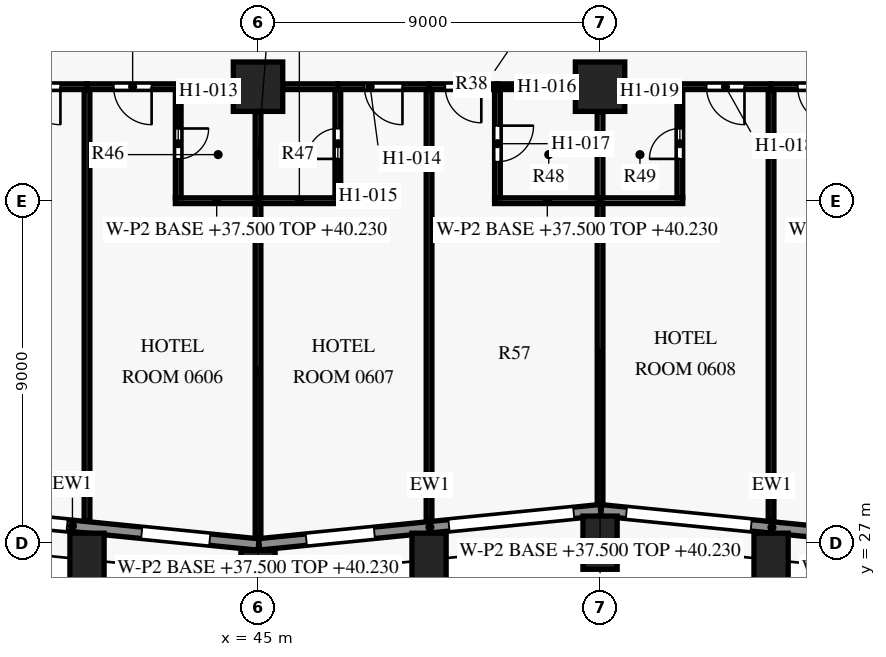
"""IFC4 building model, lengths in metres.
Left out: names, types, materials, properties, quantities, classifications, styles, units other than length and angle.
Written with IfcOpenShell. Run it as: python <this file> out.ifc"""

import sys

from ifc_helpers import new_model, si_unit, direction, frame, frame_2d, origin, origin_2d, place, context, subcontext, project, spatial, rectangle, extrude, element, fill, save


model = new_model("IFC4")
c1 = context("Model", 3, precision=1e-05, world=origin(), true_north=direction((0.0, 1.0)))
c2 = subcontext(c1, "Body", "Model", "MODEL_VIEW")
j1 = project(units=[si_unit("LENGTHUNIT", "METRE"), si_unit("PLANEANGLEUNIT", "RADIAN")], contexts=[c1])
p1 = place(None, origin())
s1 = spatial("IfcSite", under=j1, at=p1, CompositionType="ELEMENT")
p2 = place(p1, origin())
s2 = spatial("IfcBuilding", under=s1, at=p2, CompositionType="ELEMENT")
p3 = place(p2, frame((0.0, 0.0, 37.5)))
s3 = spatial("IfcBuildingStorey", under=s2, at=p3, CompositionType="ELEMENT", Elevation=37.5)
for number, where, z_axis, x_axis in (
    (1, (40.5, 26.55, 0.0), (0.0, 0.0, 1.0), (0.995, -0.1, 0.0)),
    (2, (45.0, 26.1, 0.0), (0.0, 0.0, 1.0), (1.0, 0.0, 0.0)),
    (3, (49.5, 26.55, 0.0), (0.0, 0.0, 1.0), (0.995, 0.1, 0.0)),
    (4, (54.0, 27.0, 0.0), (0.0, 0.0, 1.0), (1.0, 0.0, 0.0)),
    (5, (58.5, 26.55, 0.0), (0.0, 0.0, 1.0), (0.995, -0.1, 0.0)),
):
    element("IfcColumn", number, at=place(p3, frame(where, z_axis=z_axis, x_axis=x_axis)), inside=s3, PredefinedType="COLUMN", context=c2, shape_type="SweptSolid", body=[
        extrude(rectangle(XDim=0.9, YDim=1.4, at=origin_2d()), origin(), (0.0, 0.0, 1.0), 3.6),
    ])
for number, where, z_axis, x_axis in (
    (6, (45.0, 39.0, 0.0), (0.0, 0.0, 1.0), (1.0, 0.0, 0.0)),
    (7, (54.0, 39.0, 0.0), (0.0, 0.0, 1.0), (1.0, 0.0, 0.0)),
):
    element("IfcColumn", number, at=place(p3, frame(where, z_axis=z_axis, x_axis=x_axis)), inside=s3, PredefinedType="COLUMN", context=c2, shape_type="SweptSolid", body=[
        extrude(rectangle(XDim=1.3, YDim=1.3, at=origin_2d()), origin(), (0.0, 0.0, 1.0), 3.6),
    ])
p4 = place(p3, frame((45.015, 26.953, 0.0), z_axis=(0.0, 0.0, 1.0), x_axis=(-0.995036699177, 0.099508629231, 0.0)))
e8 = element("IfcWall", 8, at=p4, inside=s3, PredefinedType="SOLIDWALL", context=c2, shape_type="SweptSolid", body=[
    extrude(rectangle(XDim=9.846, YDim=0.3, at=frame_2d((4.923, 0.0))), origin(), (0.0, 0.0, 1.0), 2.95),
])
p5 = place(p4, frame((1.291, 0.0, 0.75)))
e9 = element("IfcOpeningElement", 9, at=p5, cuts=e8, PredefinedType="OPENING", context=c2, shape_type="SweptSolid", body=[
    extrude(rectangle(XDim=1.8, YDim=1.8, at=frame_2d((0.9, 0.9))), frame((0.0, 0.16, 0.0), z_axis=(0.0, -1.0, 0.0), x_axis=(1.0, 0.0, 0.0)), (0.0, 0.0, 1.0), 0.32),
])
p6 = place(p4, frame((5.064, 0.0, 0.15)))
e10 = element("IfcOpeningElement", 10, at=p6, cuts=e8, PredefinedType="OPENING", context=c2, shape_type="SweptSolid", body=[
    extrude(rectangle(XDim=3.3, YDim=2.4, at=frame_2d((1.65, 1.2))), frame((0.0, 0.16, 0.0), z_axis=(0.0, -1.0, 0.0), x_axis=(1.0, 0.0, 0.0)), (0.0, 0.0, 1.0), 0.32),
])
p7 = place(p3, frame((54.015, 27.856, 0.0), z_axis=(0.0, 0.0, 1.0), x_axis=(-0.995037993253, -0.099495688264, 0.0)))
e11 = element("IfcWall", 11, at=p7, inside=s3, PredefinedType="SOLIDWALL", context=c2, shape_type="SweptSolid", body=[
    extrude(rectangle(XDim=9.03, YDim=0.3, at=frame_2d((4.515, 0.0))), origin(), (0.0, 0.0, 1.0), 2.95),
])
p8 = place(p7, frame((0.711, 0.0, 0.15)))
e12 = element("IfcOpeningElement", 12, at=p8, cuts=e11, PredefinedType="OPENING", context=c2, shape_type="SweptSolid", body=[
    extrude(rectangle(XDim=3.3, YDim=2.4, at=frame_2d((1.65, 1.2))), frame((0.0, 0.16, 0.0), z_axis=(0.0, -1.0, 0.0), x_axis=(1.0, 0.0, 0.0)), (0.0, 0.0, 1.0), 0.32),
])
p9 = place(p7, frame((5.984, 0.0, 0.75)))
e13 = element("IfcOpeningElement", 13, at=p9, cuts=e11, PredefinedType="OPENING", context=c2, shape_type="SweptSolid", body=[
    extrude(rectangle(XDim=1.8, YDim=1.8, at=frame_2d((0.9, 0.9))), frame((0.0, 0.16, 0.0), z_axis=(0.0, -1.0, 0.0), x_axis=(1.0, 0.0, 0.0)), (0.0, 0.0, 1.0), 0.32),
])
p10 = place(p3, frame((63.015, 26.953, 0.0), z_axis=(0.0, 0.0, 1.0), x_axis=(-0.995035316196, 0.099522457379, 0.0)))
e14 = element("IfcWall", 14, at=p10, inside=s3, PredefinedType="SOLIDWALL", context=c2, shape_type="SweptSolid", body=[
    extrude(rectangle(XDim=9.03, YDim=0.3, at=frame_2d((4.515, 0.0))), origin(), (0.0, 0.0, 1.0), 2.95),
])
p11 = place(p10, frame((1.291, 0.0, 0.75)))
e15 = element("IfcOpeningElement", 15, at=p11, cuts=e14, PredefinedType="OPENING", context=c2, shape_type="SweptSolid", body=[
    extrude(rectangle(XDim=1.8, YDim=1.8, at=frame_2d((0.9, 0.9))), frame((0.0, 0.16, 0.0), z_axis=(0.0, -1.0, 0.0), x_axis=(1.0, 0.0, 0.0)), (0.0, 0.0, 1.0), 0.32),
])
p12 = place(p10, frame((5.064, 0.0, 0.15)))
e16 = element("IfcOpeningElement", 16, at=p12, cuts=e14, PredefinedType="OPENING", context=c2, shape_type="SweptSolid", body=[
    extrude(rectangle(XDim=3.3, YDim=2.4, at=frame_2d((1.65, 1.2))), frame((0.0, 0.16, 0.0), z_axis=(0.0, -1.0, 0.0), x_axis=(1.0, 0.0, 0.0)), (0.0, 0.0, 1.0), 0.32),
])
p13 = place(p3, frame((45.0, 35.925, 0.0), z_axis=(0.0, 0.0, 1.0), x_axis=(0.0, -1.0, 0.0)))
e17 = element("IfcWall", 17, at=p13, inside=s3, PredefinedType="PARTITIONING", context=c2, shape_type="SweptSolid", body=[
    extrude(rectangle(XDim=8.8, YDim=0.15, at=frame_2d((4.4, 0.0))), origin(), (0.0, 0.0, 1.0), 2.73),
])
p14 = place(p3, frame((54.0, 35.925, 0.0), z_axis=(0.0, 0.0, 1.0), x_axis=(0.0, -1.0, 0.0)))
e18 = element("IfcWall", 18, at=p14, inside=s3, PredefinedType="PARTITIONING", context=c2, shape_type="SweptSolid", body=[
    extrude(rectangle(XDim=7.9, YDim=0.15, at=frame_2d((3.95, 0.0))), origin(), (0.0, 0.0, 1.0), 2.73),
])
for number, where, z_axis, x_axis in (
    (19, (42.825, 36.0, 0.0), (0.0, 0.0, 1.0), (1.0, 0.0, 0.0)),
    (20, (45.0, 36.0, 0.0), (0.0, 0.0, 1.0), (1.0, 0.0, 0.0)),
):
    element("IfcWall", number, at=place(p3, frame(where, z_axis=z_axis, x_axis=x_axis)), inside=s3, PredefinedType="PARTITIONING", context=c2, shape_type="SweptSolid", body=[
        extrude(rectangle(XDim=2.175, YDim=0.15, at=frame_2d((1.087, 0.0))), origin(), (0.0, 0.0, 1.0), 2.73),
    ])
p15 = place(p3, frame((51.225, 36.0, 0.0), z_axis=(0.0, 0.0, 1.0), x_axis=(1.0, 0.0, 0.0)))
e21 = element("IfcWall", 21, at=p15, inside=s3, PredefinedType="PARTITIONING", context=c2, shape_type="SweptSolid", body=[
    extrude(rectangle(XDim=2.775, YDim=0.15, at=frame_2d((1.387, 0.0))), origin(), (0.0, 0.0, 1.0), 2.73),
])
p16 = place(p3, frame((54.0, 36.0, 0.0), z_axis=(0.0, 0.0, 1.0), x_axis=(1.0, 0.0, 0.0)))
e22 = element("IfcWall", 22, at=p16, inside=s3, PredefinedType="PARTITIONING", context=c2, shape_type="SweptSolid", body=[
    extrude(rectangle(XDim=2.175, YDim=0.15, at=frame_2d((1.087, 0.0))), origin(), (0.0, 0.0, 1.0), 2.73),
])
p17 = place(p3, frame((47.1, 36.075, 0.0), z_axis=(0.0, 0.0, 1.0), x_axis=(0.0, 1.0, 0.0)))
e23 = element("IfcWall", 23, at=p17, inside=s3, PredefinedType="PARTITIONING", context=c2, shape_type="SweptSolid", body=[
    extrude(rectangle(XDim=2.85, YDim=0.15, at=frame_2d((1.425, 0.0))), origin(), (0.0, 0.0, 1.0), 2.58),
])
p18 = place(p17, frame((1.025, 0.0, 0.0)))
e24 = element("IfcOpeningElement", 24, at=p18, cuts=e23, PredefinedType="OPENING", context=c2, shape_type="SweptSolid", body=[
    extrude(rectangle(XDim=0.8, YDim=2.1, at=frame_2d((0.4, 1.05))), frame((0.0, 0.085, 0.0), z_axis=(0.0, -1.0, 0.0), x_axis=(1.0, 0.0, 0.0)), (0.0, 0.0, 1.0), 0.17),
])
p19 = place(p3, frame((56.1, 36.075, 0.0), z_axis=(0.0, 0.0, 1.0), x_axis=(0.0, 1.0, 0.0)))
e25 = element("IfcWall", 25, at=p19, inside=s3, PredefinedType="PARTITIONING", context=c2, shape_type="SweptSolid", body=[
    extrude(rectangle(XDim=2.85, YDim=0.15, at=frame_2d((1.425, 0.0))), origin(), (0.0, 0.0, 1.0), 2.58),
])
p20 = place(p19, frame((1.025, 0.0, 0.0)))
e26 = element("IfcOpeningElement", 26, at=p20, cuts=e25, PredefinedType="OPENING", context=c2, shape_type="SweptSolid", body=[
    extrude(rectangle(XDim=0.8, YDim=2.1, at=frame_2d((0.4, 1.05))), frame((0.0, 0.085, 0.0), z_axis=(0.0, -1.0, 0.0), x_axis=(1.0, 0.0, 0.0)), (0.0, 0.0, 1.0), 0.17),
])
for number, where, z_axis, x_axis in (
    (27, (45.0, 38.345, 0.0), (0.0, 0.0, 1.0), (0.0, -1.0, 0.0)),
    (28, (54.0, 38.345, 0.0), (0.0, 0.0, 1.0), (0.0, -1.0, 0.0)),
):
    element("IfcWall", number, at=place(p3, frame(where, z_axis=z_axis, x_axis=x_axis)), inside=s3, PredefinedType="PARTITIONING", context=c2, shape_type="SweptSolid", body=[
        extrude(rectangle(XDim=2.27, YDim=0.15, at=frame_2d((1.135, 0.0))), origin(), (0.0, 0.0, 1.0), 2.73),
    ])
p21 = place(p3, frame((40.5, 38.925, 0.0), z_axis=(0.0, 0.0, 1.0), x_axis=(0.0, -1.0, 0.0)))
e29 = element("IfcWall", 29, at=p21, inside=s3, PredefinedType="PARTITIONING", context=c2, shape_type="SweptSolid", body=[
    extrude(rectangle(XDim=11.35, YDim=0.15, at=frame_2d((5.675, 0.0))), origin(), (0.0, 0.0, 1.0), 2.58),
])
p22 = place(p3, frame((42.9, 38.925, 0.0), z_axis=(0.0, 0.0, 1.0), x_axis=(0.0, -1.0, 0.0)))
e30 = element("IfcWall", 30, at=p22, inside=s3, PredefinedType="PARTITIONING", context=c2, shape_type="SweptSolid", body=[
    extrude(rectangle(XDim=2.85, YDim=0.15, at=frame_2d((1.425, 0.0))), origin(), (0.0, 0.0, 1.0), 2.58),
])
p23 = place(p22, frame((1.025, 0.0, 0.0)))
e31 = element("IfcOpeningElement", 31, at=p23, cuts=e30, PredefinedType="OPENING", context=c2, shape_type="SweptSolid", body=[
    extrude(rectangle(XDim=0.8, YDim=2.1, at=frame_2d((0.4, 1.05))), frame((0.0, 0.085, 0.0), z_axis=(0.0, -1.0, 0.0), x_axis=(1.0, 0.0, 0.0)), (0.0, 0.0, 1.0), 0.17),
])
p24 = place(p3, frame((49.5, 38.925, 0.0), z_axis=(0.0, 0.0, 1.0), x_axis=(0.0, -1.0, 0.0)))
e32 = element("IfcWall", 32, at=p24, inside=s3, PredefinedType="PARTITIONING", context=c2, shape_type="SweptSolid", body=[
    extrude(rectangle(XDim=11.35, YDim=0.15, at=frame_2d((5.675, 0.0))), origin(), (0.0, 0.0, 1.0), 2.58),
])
p25 = place(p3, frame((51.3, 38.925, 0.0), z_axis=(0.0, 0.0, 1.0), x_axis=(0.0, -1.0, 0.0)))
e33 = element("IfcWall", 33, at=p25, inside=s3, PredefinedType="PARTITIONING", context=c2, shape_type="SweptSolid", body=[
    extrude(rectangle(XDim=2.85, YDim=0.15, at=frame_2d((1.425, 0.0))), origin(), (0.0, 0.0, 1.0), 2.58),
])
p26 = place(p25, frame((0.95, 0.0, 0.0)))
e34 = element("IfcOpeningElement", 34, at=p26, cuts=e33, PredefinedType="OPENING", context=c2, shape_type="SweptSolid", body=[
    extrude(rectangle(XDim=0.95, YDim=2.1, at=frame_2d((0.475, 1.05))), frame((0.0, 0.085, 0.0), z_axis=(0.0, -1.0, 0.0), x_axis=(1.0, 0.0, 0.0)), (0.0, 0.0, 1.0), 0.17),
])
p27 = place(p3, frame((58.5, 38.925, 0.0), z_axis=(0.0, 0.0, 1.0), x_axis=(0.0, -1.0, 0.0)))
e35 = element("IfcWall", 35, at=p27, inside=s3, PredefinedType="PARTITIONING", context=c2, shape_type="SweptSolid", body=[
    extrude(rectangle(XDim=11.35, YDim=0.15, at=frame_2d((5.675, 0.0))), origin(), (0.0, 0.0, 1.0), 2.58),
])
p28 = place(p3, frame((40.5, 39.0, 0.0), z_axis=(0.0, 0.0, 1.0), x_axis=(-1.0, 0.0, 0.0)))
e36 = element("IfcWall", 36, at=p28, inside=s3, PredefinedType="PARTITIONING", context=c2, shape_type="SweptSolid", body=[
    extrude(rectangle(XDim=2.4, YDim=0.15, at=frame_2d((1.2, 0.0))), origin(), (0.0, 0.0, 1.0), 2.58),
])
p29 = place(p28, frame((0.7, 0.0, 0.0)))
e37 = element("IfcOpeningElement", 37, at=p29, cuts=e36, PredefinedType="OPENING", context=c2, shape_type="SweptSolid", body=[
    extrude(rectangle(XDim=1.0, YDim=2.1, at=frame_2d((0.5, 1.05))), frame((0.0, 0.085, 0.0), z_axis=(0.0, -1.0, 0.0), x_axis=(1.0, 0.0, 0.0)), (0.0, 0.0, 1.0), 0.17),
])
p30 = place(p3, frame((42.9, 39.0, 0.0), z_axis=(0.0, 0.0, 1.0), x_axis=(-1.0, 0.0, 0.0)))
e38 = element("IfcWall", 38, at=p30, inside=s3, PredefinedType="PARTITIONING", context=c2, shape_type="SweptSolid", body=[
    extrude(rectangle(XDim=2.4, YDim=0.15, at=frame_2d((1.2, 0.0))), origin(), (0.0, 0.0, 1.0), 2.58),
])
p31 = place(p30, frame((0.7, 0.0, 0.0)))
e39 = element("IfcOpeningElement", 39, at=p31, cuts=e38, PredefinedType="OPENING", context=c2, shape_type="SweptSolid", body=[
    extrude(rectangle(XDim=1.0, YDim=2.1, at=frame_2d((0.5, 1.05))), frame((0.0, 0.085, 0.0), z_axis=(0.0, -1.0, 0.0), x_axis=(1.0, 0.0, 0.0)), (0.0, 0.0, 1.0), 0.17),
])
for number, where, z_axis, x_axis in (
    (40, (44.345, 39.0, 0.0), (0.0, 0.0, 1.0), (-1.0, 0.0, 0.0)),
    (41, (47.1, 39.0, 0.0), (0.0, 0.0, 1.0), (-1.0, 0.0, 0.0)),
):
    element("IfcWall", number, at=place(p3, frame(where, z_axis=z_axis, x_axis=x_axis)), inside=s3, PredefinedType="PARTITIONING", context=c2, shape_type="SweptSolid", body=[
        extrude(rectangle(XDim=1.445, YDim=0.15, at=frame_2d((0.723, 0.0))), origin(), (0.0, 0.0, 1.0), 2.58),
    ])
p32 = place(p3, frame((49.5, 39.0, 0.0), z_axis=(0.0, 0.0, 1.0), x_axis=(-1.0, 0.0, 0.0)))
e42 = element("IfcWall", 42, at=p32, inside=s3, PredefinedType="PARTITIONING", context=c2, shape_type="SweptSolid", body=[
    extrude(rectangle(XDim=2.4, YDim=0.15, at=frame_2d((1.2, 0.0))), origin(), (0.0, 0.0, 1.0), 2.58),
])
p33 = place(p32, frame((0.7, 0.0, 0.0)))
e43 = element("IfcOpeningElement", 43, at=p33, cuts=e42, PredefinedType="OPENING", context=c2, shape_type="SweptSolid", body=[
    extrude(rectangle(XDim=1.0, YDim=2.1, at=frame_2d((0.5, 1.05))), frame((0.0, 0.085, 0.0), z_axis=(0.0, -1.0, 0.0), x_axis=(1.0, 0.0, 0.0)), (0.0, 0.0, 1.0), 0.17),
])
p34 = place(p3, frame((51.3, 39.0, 0.0), z_axis=(0.0, 0.0, 1.0), x_axis=(-1.0, 0.0, 0.0)))
e44 = element("IfcWall", 44, at=p34, inside=s3, PredefinedType="PARTITIONING", context=c2, shape_type="SweptSolid", body=[
    extrude(rectangle(XDim=1.8, YDim=0.15, at=frame_2d((0.9, 0.0))), origin(), (0.0, 0.0, 1.0), 2.58),
])
p35 = place(p34, frame((0.425, 0.0, 0.0)))
e45 = element("IfcOpeningElement", 45, at=p35, cuts=e44, PredefinedType="OPENING", context=c2, shape_type="SweptSolid", body=[
    extrude(rectangle(XDim=0.95, YDim=2.1, at=frame_2d((0.475, 1.05))), frame((0.0, 0.085, 0.0), z_axis=(0.0, -1.0, 0.0), x_axis=(1.0, 0.0, 0.0)), (0.0, 0.0, 1.0), 0.17),
])
p36 = place(p3, frame((53.345, 39.0, 0.0), z_axis=(0.0, 0.0, 1.0), x_axis=(-1.0, 0.0, 0.0)))
e46 = element("IfcWall", 46, at=p36, inside=s3, PredefinedType="PARTITIONING", context=c2, shape_type="SweptSolid", body=[
    extrude(rectangle(XDim=2.045, YDim=0.15, at=frame_2d((1.022, 0.0))), origin(), (0.0, 0.0, 1.0), 2.58),
])
p37 = place(p3, frame((56.1, 39.0, 0.0), z_axis=(0.0, 0.0, 1.0), x_axis=(-1.0, 0.0, 0.0)))
e47 = element("IfcWall", 47, at=p37, inside=s3, PredefinedType="PARTITIONING", context=c2, shape_type="SweptSolid", body=[
    extrude(rectangle(XDim=1.445, YDim=0.15, at=frame_2d((0.723, 0.0))), origin(), (0.0, 0.0, 1.0), 2.58),
])
p38 = place(p3, frame((58.5, 39.0, 0.0), z_axis=(0.0, 0.0, 1.0), x_axis=(-1.0, 0.0, 0.0)))
e48 = element("IfcWall", 48, at=p38, inside=s3, PredefinedType="PARTITIONING", context=c2, shape_type="SweptSolid", body=[
    extrude(rectangle(XDim=2.4, YDim=0.15, at=frame_2d((1.2, 0.0))), origin(), (0.0, 0.0, 1.0), 2.58),
])
p39 = place(p38, frame((0.7, 0.0, 0.0)))
e49 = element("IfcOpeningElement", 49, at=p39, cuts=e48, PredefinedType="OPENING", context=c2, shape_type="SweptSolid", body=[
    extrude(rectangle(XDim=1.0, YDim=2.1, at=frame_2d((0.5, 1.05))), frame((0.0, 0.085, 0.0), z_axis=(0.0, -1.0, 0.0), x_axis=(1.0, 0.0, 0.0)), (0.0, 0.0, 1.0), 0.17),
])
p40 = place(p3, frame((60.9, 39.0, 0.0), z_axis=(0.0, 0.0, 1.0), x_axis=(-1.0, 0.0, 0.0)))
e50 = element("IfcWall", 50, at=p40, inside=s3, PredefinedType="PARTITIONING", context=c2, shape_type="SweptSolid", body=[
    extrude(rectangle(XDim=2.4, YDim=0.15, at=frame_2d((1.2, 0.0))), origin(), (0.0, 0.0, 1.0), 2.58),
])
p41 = place(p40, frame((0.7, 0.0, 0.0)))
e51 = element("IfcOpeningElement", 51, at=p41, cuts=e50, PredefinedType="OPENING", context=c2, shape_type="SweptSolid", body=[
    extrude(rectangle(XDim=1.0, YDim=2.1, at=frame_2d((0.5, 1.05))), frame((0.0, 0.085, 0.0), z_axis=(0.0, -1.0, 0.0), x_axis=(1.0, 0.0, 0.0)), (0.0, 0.0, 1.0), 0.17),
])
p42 = place(p5, origin())
e52 = element("IfcWindow", 52, at=p42, inside=s3, PartitioningType="SINGLE_PANEL", PredefinedType="WINDOW", context=c2, shape_type="SweptSolid", body=[
    extrude(rectangle(XDim=1.8, YDim=1.8, at=frame_2d((0.9, 0.9))), frame((0.0, 0.03, 0.0), z_axis=(0.0, -1.0, 0.0), x_axis=(1.0, 0.0, 0.0)), (0.0, 0.0, 1.0), 0.06),
])
fill(e9, e52)
p43 = place(p6, origin())
e53 = element("IfcWindow", 53, at=p43, inside=s3, PartitioningType="SINGLE_PANEL", PredefinedType="WINDOW", context=c2, shape_type="SweptSolid", body=[
    extrude(rectangle(XDim=3.3, YDim=2.4, at=frame_2d((1.65, 1.2))), frame((0.0, 0.03, 0.0), z_axis=(0.0, -1.0, 0.0), x_axis=(1.0, 0.0, 0.0)), (0.0, 0.0, 1.0), 0.06),
])
fill(e10, e53)
p44 = place(p8, origin())
e54 = element("IfcWindow", 54, at=p44, inside=s3, PartitioningType="SINGLE_PANEL", PredefinedType="WINDOW", context=c2, shape_type="SweptSolid", body=[
    extrude(rectangle(XDim=3.3, YDim=2.4, at=frame_2d((1.65, 1.2))), frame((0.0, 0.03, 0.0), z_axis=(0.0, -1.0, 0.0), x_axis=(1.0, 0.0, 0.0)), (0.0, 0.0, 1.0), 0.06),
])
fill(e12, e54)
p45 = place(p9, origin())
e55 = element("IfcWindow", 55, at=p45, inside=s3, PartitioningType="SINGLE_PANEL", PredefinedType="WINDOW", context=c2, shape_type="SweptSolid", body=[
    extrude(rectangle(XDim=1.8, YDim=1.8, at=frame_2d((0.9, 0.9))), frame((0.0, 0.03, 0.0), z_axis=(0.0, -1.0, 0.0), x_axis=(1.0, 0.0, 0.0)), (0.0, 0.0, 1.0), 0.06),
])
fill(e13, e55)
p46 = place(p12, origin())
e56 = element("IfcWindow", 56, at=p46, inside=s3, PartitioningType="SINGLE_PANEL", PredefinedType="WINDOW", context=c2, shape_type="SweptSolid", body=[
    extrude(rectangle(XDim=3.3, YDim=2.4, at=frame_2d((1.65, 1.2))), frame((0.0, 0.03, 0.0), z_axis=(0.0, -1.0, 0.0), x_axis=(1.0, 0.0, 0.0)), (0.0, 0.0, 1.0), 0.06),
])
fill(e16, e56)
p47 = place(p29, origin())
e57 = element("IfcDoor", 57, at=p47, inside=s3, OperationType="SINGLE_SWING_LEFT", PredefinedType="DOOR", context=c2, shape_type="SweptSolid", body=[
    extrude(rectangle(XDim=1.0, YDim=2.1, at=frame_2d((0.5, 1.05))), frame((0.0, 0.025, 0.0), z_axis=(0.0, -1.0, 0.0), x_axis=(1.0, 0.0, 0.0)), (0.0, 0.0, 1.0), 0.05),
])
fill(e37, e57)
p48 = place(p31, origin())
e58 = element("IfcDoor", 58, at=p48, inside=s3, OperationType="SINGLE_SWING_LEFT", PredefinedType="DOOR", context=c2, shape_type="SweptSolid", body=[
    extrude(rectangle(XDim=1.0, YDim=2.1, at=frame_2d((0.5, 1.05))), frame((0.0, 0.025, 0.0), z_axis=(0.0, -1.0, 0.0), x_axis=(1.0, 0.0, 0.0)), (0.0, 0.0, 1.0), 0.05),
])
fill(e39, e58)
p49 = place(p23, origin())
e59 = element("IfcDoor", 59, at=p49, inside=s3, OperationType="SINGLE_SWING_LEFT", PredefinedType="DOOR", context=c2, shape_type="SweptSolid", body=[
    extrude(rectangle(XDim=0.8, YDim=2.1, at=frame_2d((0.4, 1.05))), frame((0.0, 0.025, 0.0), z_axis=(0.0, -1.0, 0.0), x_axis=(1.0, 0.0, 0.0)), (0.0, 0.0, 1.0), 0.05),
])
fill(e31, e59)
p50 = place(p33, origin())
e60 = element("IfcDoor", 60, at=p50, inside=s3, OperationType="SINGLE_SWING_LEFT", PredefinedType="DOOR", context=c2, shape_type="SweptSolid", body=[
    extrude(rectangle(XDim=1.0, YDim=2.1, at=frame_2d((0.5, 1.05))), frame((0.0, 0.025, 0.0), z_axis=(0.0, -1.0, 0.0), x_axis=(1.0, 0.0, 0.0)), (0.0, 0.0, 1.0), 0.05),
])
fill(e43, e60)
p51 = place(p18, origin())
e61 = element("IfcDoor", 61, at=p51, inside=s3, OperationType="SINGLE_SWING_LEFT", PredefinedType="DOOR", context=c2, shape_type="SweptSolid", body=[
    extrude(rectangle(XDim=0.8, YDim=2.1, at=frame_2d((0.4, 1.05))), frame((0.0, 0.025, 0.0), z_axis=(0.0, -1.0, 0.0), x_axis=(1.0, 0.0, 0.0)), (0.0, 0.0, 1.0), 0.05),
])
fill(e24, e61)
p52 = place(p35, origin())
e62 = element("IfcDoor", 62, at=p52, inside=s3, OperationType="SINGLE_SWING_LEFT", PredefinedType="DOOR", context=c2, shape_type="SweptSolid", body=[
    extrude(rectangle(XDim=0.95, YDim=2.1, at=frame_2d((0.475, 1.05))), frame((0.0, 0.025, 0.0), z_axis=(0.0, -1.0, 0.0), x_axis=(1.0, 0.0, 0.0)), (0.0, 0.0, 1.0), 0.05),
])
fill(e45, e62)
p53 = place(p26, origin())
e63 = element("IfcDoor", 63, at=p53, inside=s3, OperationType="SINGLE_SWING_LEFT", PredefinedType="DOOR", context=c2, shape_type="SweptSolid", body=[
    extrude(rectangle(XDim=0.95, YDim=2.1, at=frame_2d((0.475, 1.05))), frame((0.0, 0.025, 0.0), z_axis=(0.0, -1.0, 0.0), x_axis=(1.0, 0.0, 0.0)), (0.0, 0.0, 1.0), 0.05),
])
fill(e34, e63)
p54 = place(p39, origin())
e64 = element("IfcDoor", 64, at=p54, inside=s3, OperationType="SINGLE_SWING_LEFT", PredefinedType="DOOR", context=c2, shape_type="SweptSolid", body=[
    extrude(rectangle(XDim=1.0, YDim=2.1, at=frame_2d((0.5, 1.05))), frame((0.0, 0.025, 0.0), z_axis=(0.0, -1.0, 0.0), x_axis=(1.0, 0.0, 0.0)), (0.0, 0.0, 1.0), 0.05),
])
fill(e49, e64)
p55 = place(p20, origin())
e65 = element("IfcDoor", 65, at=p55, inside=s3, OperationType="SINGLE_SWING_LEFT", PredefinedType="DOOR", context=c2, shape_type="SweptSolid", body=[
    extrude(rectangle(XDim=0.8, YDim=2.1, at=frame_2d((0.4, 1.05))), frame((0.0, 0.025, 0.0), z_axis=(0.0, -1.0, 0.0), x_axis=(1.0, 0.0, 0.0)), (0.0, 0.0, 1.0), 0.05),
])
fill(e26, e65)
p56 = place(p41, origin())
e66 = element("IfcDoor", 66, at=p56, inside=s3, OperationType="SINGLE_SWING_LEFT", PredefinedType="DOOR", context=c2, shape_type="SweptSolid", body=[
    extrude(rectangle(XDim=1.0, YDim=2.1, at=frame_2d((0.5, 1.05))), frame((0.0, 0.025, 0.0), z_axis=(0.0, -1.0, 0.0), x_axis=(1.0, 0.0, 0.0)), (0.0, 0.0, 1.0), 0.05),
])
fill(e51, e66)
save(model, sys.argv[1])
